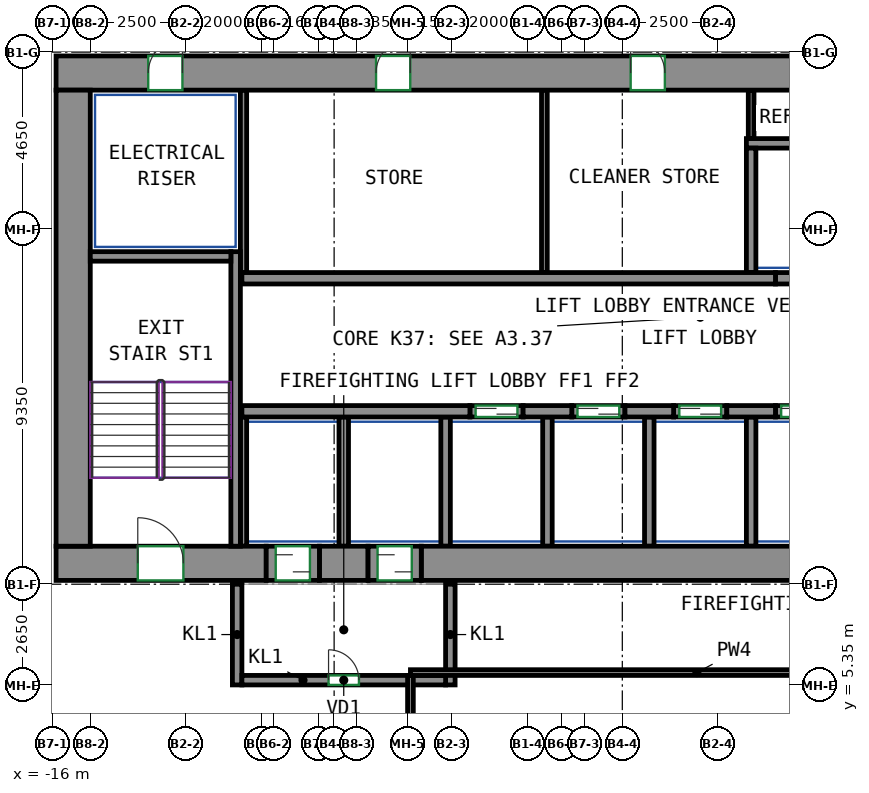
"""IFC4 building model, lengths in metres.
Left out: names, types, materials, properties, quantities, classifications, styles, units other than length and angle.
Written with IfcOpenShell. Run it as: python <this file> out.ifc"""

import sys

from ifc_helpers import new_model, si_unit, direction, frame, frame_2d, origin, place, context, subcontext, project, spatial, rectangle, extrude, source, transform, mapped, element, fill, save


model = new_model("IFC4")
c1 = context("Model", 3, precision=1e-05, world=origin(), true_north=direction((0.0, 1.0)))
c2 = subcontext(c1, "Body", "Model", "MODEL_VIEW")
j1 = project(units=[si_unit("LENGTHUNIT", "METRE"), si_unit("PLANEANGLEUNIT", "RADIAN")], contexts=[c1])
p1 = place(None, origin())
s1 = spatial("IfcSite", under=j1, at=p1, CompositionType="ELEMENT")
p2 = place(p1, origin())
s2 = spatial("IfcBuilding", under=s1, at=p2, CompositionType="ELEMENT")
p3 = place(p2, frame((0.0, 0.0, 157.5)))
s3 = spatial("IfcBuildingStorey", under=s2, at=p3, CompositionType="ELEMENT", Elevation=157.5)
m1 = source(origin(), c2, "Body", "SweptSolid", [
    extrude(rectangle(XDim=5.53, YDim=0.9, at=frame_2d((2.765, 0.0))), origin(), (0.0, 0.0, 1.0), 3.12),
])
p4 = place(p3, frame((-15.9, 8.55, 0.0), z_axis=(0.0, 0.0, 1.0), x_axis=(1.0, 0.0, 0.0)))
e1 = element("IfcWall", 1, at=p4, inside=s3, PredefinedType="SHEAR", context=c2, shape_type="MappedRepresentation", body=[
    mapped(m1, transform((0.0, 0.0, 0.0))),
])
p5 = place(p4, frame((2.15, 0.0, 0.0)))
e2 = element("IfcOpeningElement", 2, at=p5, cuts=e1, PredefinedType="OPENING", context=c2, shape_type="SweptSolid", body=[
    extrude(rectangle(XDim=1.2, YDim=2.1, at=frame_2d((0.6, 1.05))), frame((0.0, 0.46, 0.0), z_axis=(0.0, -1.0, 0.0), x_axis=(1.0, 0.0, 0.0)), (0.0, 0.0, 1.0), 0.92),
])
m2 = source(origin(), c2, "Body", "SweptSolid", [
    extrude(rectangle(XDim=1.28, YDim=0.9, at=frame_2d((0.64, 0.0))), origin(), (0.0, 0.0, 1.0), 3.12),
])
p6 = place(p3, frame((-8.97, 8.55, 0.0), z_axis=(0.0, 0.0, 1.0), x_axis=(1.0, 0.0, 0.0)))
e3 = element("IfcWall", 3, at=p6, inside=s3, PredefinedType="SHEAR", context=c2, shape_type="MappedRepresentation", body=[
    mapped(m2, transform((0.0, 0.0, 0.0))),
])
m3 = source(origin(), c2, "Body", "SweptSolid", [
    extrude(rectangle(XDim=14.18, YDim=0.9, at=frame_2d((7.09, 0.0))), origin(), (0.0, 0.0, 1.0), 3.12),
])
p7 = place(p3, frame((-6.29, 8.55, 0.0), z_axis=(0.0, 0.0, 1.0), x_axis=(1.0, 0.0, 0.0)))
e4 = element("IfcWall", 4, at=p7, inside=s3, PredefinedType="SHEAR", context=c2, shape_type="MappedRepresentation", body=[
    mapped(m3, transform((0.0, 0.0, 0.0))),
])
m4 = source(origin(), c2, "Body", "SweptSolid", [
    extrude(rectangle(XDim=33.9, YDim=0.9, at=frame_2d((16.95, 0.0))), origin(), (0.0, 0.0, 1.0), 3.12),
])
p8 = place(p3, frame((-15.9, 21.45, 0.0), z_axis=(0.0, 0.0, 1.0), x_axis=(1.0, 0.0, 0.0)))
e5 = element("IfcWall", 5, at=p8, inside=s3, PredefinedType="SHEAR", context=c2, shape_type="MappedRepresentation", body=[
    mapped(m4, transform((0.0, 0.0, 0.0))),
])
p9 = place(p8, frame((8.42, 0.0, 0.0)))
e6 = element("IfcOpeningElement", 6, at=p9, cuts=e5, PredefinedType="OPENING", context=c2, shape_type="SweptSolid", body=[
    extrude(rectangle(XDim=0.9, YDim=2.1, at=frame_2d((0.45, 1.05))), frame((0.0, 0.46, 0.0), z_axis=(0.0, -1.0, 0.0), x_axis=(1.0, 0.0, 0.0)), (0.0, 0.0, 1.0), 0.92),
])
p10 = place(p8, frame((15.12, 0.0, 0.0)))
e7 = element("IfcOpeningElement", 7, at=p10, cuts=e5, PredefinedType="OPENING", context=c2, shape_type="SweptSolid", body=[
    extrude(rectangle(XDim=0.9, YDim=2.1, at=frame_2d((0.45, 1.05))), frame((0.0, 0.46, 0.0), z_axis=(0.0, -1.0, 0.0), x_axis=(1.0, 0.0, 0.0)), (0.0, 0.0, 1.0), 0.92),
])
p11 = place(p8, frame((19.944, 0.0, 0.0)))
e8 = element("IfcOpeningElement", 8, at=p11, cuts=e5, PredefinedType="OPENING", context=c2, shape_type="SweptSolid", body=[
    extrude(rectangle(XDim=0.9, YDim=2.1, at=frame_2d((0.45, 1.05))), frame((0.0, 0.46, 0.0), z_axis=(0.0, -1.0, 0.0), x_axis=(1.0, 0.0, 0.0)), (0.0, 0.0, 1.0), 0.92),
])
p12 = place(p8, frame((25.304, 0.0, 0.0)))
e9 = element("IfcOpeningElement", 9, at=p12, cuts=e5, PredefinedType="OPENING", context=c2, shape_type="SweptSolid", body=[
    extrude(rectangle(XDim=0.9, YDim=2.1, at=frame_2d((0.45, 1.05))), frame((0.0, 0.46, 0.0), z_axis=(0.0, -1.0, 0.0), x_axis=(1.0, 0.0, 0.0)), (0.0, 0.0, 1.0), 0.92),
])
p13 = place(p8, frame((2.425, 0.0, 0.0)))
e10 = element("IfcOpeningElement", 10, at=p13, cuts=e5, PredefinedType="OPENING", context=c2, shape_type="SweptSolid", body=[
    extrude(rectangle(XDim=0.9, YDim=2.1, at=frame_2d((0.45, 1.05))), frame((0.0, 0.46, 0.0), z_axis=(0.0, -1.0, 0.0), x_axis=(1.0, 0.0, 0.0)), (0.0, 0.0, 1.0), 0.92),
])
p14 = place(p8, frame((30.575, 0.0, 0.0)))
e11 = element("IfcOpeningElement", 11, at=p14, cuts=e5, PredefinedType="OPENING", context=c2, shape_type="SweptSolid", body=[
    extrude(rectangle(XDim=0.9, YDim=2.1, at=frame_2d((0.45, 1.05))), frame((0.0, 0.46, 0.0), z_axis=(0.0, -1.0, 0.0), x_axis=(1.0, 0.0, 0.0)), (0.0, 0.0, 1.0), 0.92),
])
m5 = source(origin(), c2, "Body", "SweptSolid", [
    extrude(rectangle(XDim=12.0, YDim=0.9, at=frame_2d((6.0, 0.0))), origin(), (0.0, 0.0, 1.0), 3.12),
])
p15 = place(p3, frame((-15.45, 9.0, 0.0), z_axis=(0.0, 0.0, 1.0), x_axis=(0.0, 1.0, 0.0)))
e12 = element("IfcWall", 12, at=p15, inside=s3, PredefinedType="SHEAR", context=c2, shape_type="MappedRepresentation", body=[
    mapped(m5, transform((0.0, 0.0, 0.0))),
])
m6 = source(origin(), c2, "Body", "SweptSolid", [
    extrude(rectangle(XDim=7.75, YDim=0.25, at=frame_2d((3.875, 0.0))), origin(), (0.0, 0.0, 1.0), 3.12),
])
p16 = place(p3, frame((-11.175, 9.0, 0.0), z_axis=(0.0, 0.0, 1.0), x_axis=(0.0, 1.0, 0.0)))
e13 = element("IfcWall", 13, at=p16, inside=s3, PredefinedType="SHEAR", context=c2, shape_type="MappedRepresentation", body=[
    mapped(m6, transform((0.0, 0.0, 0.0))),
])
m7 = source(origin(), c2, "Body", "SweptSolid", [
    extrude(rectangle(XDim=3.7, YDim=0.25, at=frame_2d((1.85, 0.0))), origin(), (0.0, 0.0, 1.0), 3.12),
])
p17 = place(p3, frame((-15.0, 16.625, 0.0), z_axis=(0.0, 0.0, 1.0), x_axis=(1.0, 0.0, 0.0)))
e14 = element("IfcWall", 14, at=p17, inside=s3, PredefinedType="SHEAR", context=c2, shape_type="MappedRepresentation", body=[
    mapped(m7, transform((0.0, 0.0, 0.0))),
])
m8 = source(origin(), c2, "Body", "SweptSolid", [
    extrude(rectangle(XDim=6.0, YDim=0.3, at=frame_2d((3.0, 0.0))), origin(), (0.0, 0.0, 1.0), 3.12),
])
p18 = place(p3, frame((-11.01, 12.55, 0.0), z_axis=(0.0, 0.0, 1.0), x_axis=(1.0, 0.0, 0.0)))
e15 = element("IfcWall", 15, at=p18, inside=s3, PredefinedType="SHEAR", context=c2, shape_type="MappedRepresentation", body=[
    mapped(m8, transform((0.0, 0.0, 0.0))),
])
m9 = source(origin(), c2, "Body", "SweptSolid", [
    extrude(rectangle(XDim=1.28, YDim=0.3, at=frame_2d((0.64, 0.0))), origin(), (0.0, 0.0, 1.0), 3.12),
])
for number, where, z_axis, x_axis in (
    (16, (-3.61, 12.55, 0.0), (0.0, 0.0, 1.0), (1.0, 0.0, 0.0)),
    (17, (-0.93, 12.55, 0.0), (0.0, 0.0, 1.0), (1.0, 0.0, 0.0)),
    (18, (1.75, 12.55, 0.0), (0.0, 0.0, 1.0), (1.0, 0.0, 0.0)),
):
    element("IfcWall", number, at=place(p3, frame(where, z_axis=z_axis, x_axis=x_axis)), inside=s3, PredefinedType="SHEAR", context=c2, shape_type="MappedRepresentation", body=[
        mapped(m9, transform((0.0, 0.0, 0.0))),
    ])
m10 = source(origin(), c2, "Body", "SweptSolid", [
    extrude(rectangle(XDim=14.04, YDim=0.3, at=frame_2d((7.02, 0.0))), origin(), (0.0, 0.0, 1.0), 3.12),
])
p19 = place(p3, frame((-11.01, 16.05, 0.0), z_axis=(0.0, 0.0, 1.0), x_axis=(1.0, 0.0, 0.0)))
e19 = element("IfcWall", 19, at=p19, inside=s3, PredefinedType="SHEAR", context=c2, shape_type="MappedRepresentation", body=[
    mapped(m10, transform((0.0, 0.0, 0.0))),
])
m11 = source(origin(), c2, "Body", "SweptSolid", [
    extrude(rectangle(XDim=1.4, YDim=0.3, at=frame_2d((0.7, 0.0))), origin(), (0.0, 0.0, 1.0), 3.12),
])
p20 = place(p3, frame((-5.01, 12.55, 0.0), z_axis=(0.0, 0.0, 1.0), x_axis=(1.0, 0.0, 0.0)))
e20 = element("IfcWall", 20, at=p20, inside=s3, PredefinedType="PARTITIONING", context=c2, shape_type="MappedRepresentation", body=[
    mapped(m11, transform((0.0, 0.0, 0.0))),
])
p21 = place(p20, frame((0.15, 0.0, 0.0)))
e21 = element("IfcOpeningElement", 21, at=p21, cuts=e20, PredefinedType="OPENING", context=c2, shape_type="SweptSolid", body=[
    extrude(rectangle(XDim=1.1, YDim=2.1, at=frame_2d((0.55, 1.05))), frame((0.0, 0.16, 0.0), z_axis=(0.0, -1.0, 0.0), x_axis=(1.0, 0.0, 0.0)), (0.0, 0.0, 1.0), 0.32),
])
m12 = source(origin(), c2, "Body", "SweptSolid", [
    extrude(rectangle(XDim=1.4, YDim=0.3, at=frame_2d((0.7, 0.0))), origin(), (0.0, 0.0, 1.0), 3.12),
])
p22 = place(p3, frame((-2.33, 12.55, 0.0), z_axis=(0.0, 0.0, 1.0), x_axis=(1.0, 0.0, 0.0)))
e22 = element("IfcWall", 22, at=p22, inside=s3, PredefinedType="PARTITIONING", context=c2, shape_type="MappedRepresentation", body=[
    mapped(m12, transform((0.0, 0.0, 0.0))),
])
p23 = place(p22, frame((0.15, 0.0, 0.0)))
e23 = element("IfcOpeningElement", 23, at=p23, cuts=e22, PredefinedType="OPENING", context=c2, shape_type="SweptSolid", body=[
    extrude(rectangle(XDim=1.1, YDim=2.1, at=frame_2d((0.55, 1.05))), frame((0.0, 0.16, 0.0), z_axis=(0.0, -1.0, 0.0), x_axis=(1.0, 0.0, 0.0)), (0.0, 0.0, 1.0), 0.32),
])
p24 = place(p3, frame((0.35, 12.55, 0.0), z_axis=(0.0, 0.0, 1.0), x_axis=(1.0, 0.0, 0.0)))
e24 = element("IfcWall", 24, at=p24, inside=s3, PredefinedType="PARTITIONING", context=c2, shape_type="MappedRepresentation", body=[
    mapped(m11, transform((0.0, 0.0, 0.0))),
])
p25 = place(p24, frame((0.15, 0.0, 0.0)))
e25 = element("IfcOpeningElement", 25, at=p25, cuts=e24, PredefinedType="OPENING", context=c2, shape_type="SweptSolid", body=[
    extrude(rectangle(XDim=1.1, YDim=2.1, at=frame_2d((0.55, 1.05))), frame((0.0, 0.16, 0.0), z_axis=(0.0, -1.0, 0.0), x_axis=(1.0, 0.0, 0.0)), (0.0, 0.0, 1.0), 0.32),
])
p26 = place(p3, frame((3.03, 12.55, 0.0), z_axis=(0.0, 0.0, 1.0), x_axis=(1.0, 0.0, 0.0)))
e26 = element("IfcWall", 26, at=p26, inside=s3, PredefinedType="PARTITIONING", context=c2, shape_type="MappedRepresentation", body=[
    mapped(m11, transform((0.0, 0.0, 0.0))),
])
p27 = place(p26, frame((0.15, 0.0, 0.0)))
e27 = element("IfcOpeningElement", 27, at=p27, cuts=e26, PredefinedType="OPENING", context=c2, shape_type="SweptSolid", body=[
    extrude(rectangle(XDim=1.1, YDim=2.1, at=frame_2d((0.55, 1.05))), frame((0.0, 0.16, 0.0), z_axis=(0.0, -1.0, 0.0), x_axis=(1.0, 0.0, 0.0)), (0.0, 0.0, 1.0), 0.32),
])
p28 = place(p3, frame((3.03, 16.05, 0.0), z_axis=(0.0, 0.0, 1.0), x_axis=(1.0, 0.0, 0.0)))
e28 = element("IfcWall", 28, at=p28, inside=s3, PredefinedType="PARTITIONING", context=c2, shape_type="MappedRepresentation", body=[
    mapped(m11, transform((0.0, 0.0, 0.0))),
])
m13 = source(origin(), c2, "Body", "SweptSolid", [
    extrude(rectangle(XDim=2.65, YDim=0.25, at=frame_2d((1.325, 0.0))), origin(), (0.0, 0.0, 1.0), 3.12),
])
for number, where, z_axis, x_axis in (
    (29, (-11.135, 5.35, 0.0), (0.0, 0.0, 1.0), (0.0, 1.0, 0.0)),
    (30, (-5.525, 5.35, 0.0), (0.0, 0.0, 1.0), (0.0, 1.0, 0.0)),
):
    element("IfcWall", number, at=place(p3, frame(where, z_axis=z_axis, x_axis=x_axis)), inside=s3, PredefinedType="PARTITIONING", context=c2, shape_type="MappedRepresentation", body=[
        mapped(m13, transform((0.0, 0.0, 0.0))),
    ])
m14 = source(origin(), c2, "Body", "SweptSolid", [
    extrude(rectangle(XDim=5.36, YDim=0.25, at=frame_2d((2.68, 0.0))), origin(), (0.0, 0.0, 1.0), 3.12),
])
p29 = place(p3, frame((-11.01, 5.475, 0.0), z_axis=(0.0, 0.0, 1.0), x_axis=(1.0, 0.0, 0.0)))
e31 = element("IfcWall", 31, at=p29, inside=s3, PredefinedType="PARTITIONING", context=c2, shape_type="MappedRepresentation", body=[
    mapped(m14, transform((0.0, 0.0, 0.0))),
])
p30 = place(p29, frame((2.28, 0.0, 0.0)))
e32 = element("IfcOpeningElement", 32, at=p30, cuts=e31, PredefinedType="OPENING", context=c2, shape_type="SweptSolid", body=[
    extrude(rectangle(XDim=0.8, YDim=2.0, at=frame_2d((0.4, 1.0))), frame((0.0, 0.135, 0.0), z_axis=(0.0, -1.0, 0.0), x_axis=(1.0, 0.0, 0.0)), (0.0, 0.0, 1.0), 0.27),
])
m15 = source(origin(), c2, "Body", "SweptSolid", [
    extrude(rectangle(XDim=10.97, YDim=0.25, at=frame_2d((5.485, 0.0))), origin(), (0.0, 0.0, 1.0), 3.12),
])
p31 = place(p3, frame((2.265, 19.6, 0.0), z_axis=(0.0, 0.0, 1.0), x_axis=(1.0, 0.0, 0.0)))
e33 = element("IfcWall", 33, at=p31, inside=s3, PredefinedType="PARTITIONING", context=c2, shape_type="MappedRepresentation", body=[
    mapped(m15, transform((0.0, 0.0, 0.0))),
])
m16 = source(origin(), c2, "Body", "SweptSolid", [
    extrude(rectangle(XDim=4.8, YDim=0.165, at=frame_2d((2.4, 0.0))), origin(), (0.0, 0.0, 1.0), 3.12),
])
p32 = place(p3, frame((-10.968, 16.2, 0.0), z_axis=(0.0, 0.0, 1.0), x_axis=(0.0, 1.0, 0.0)))
e34 = element("IfcWall", 34, at=p32, inside=s3, PredefinedType="PARTITIONING", context=c2, shape_type="MappedRepresentation", body=[
    mapped(m16, transform((0.0, 0.0, 0.0))),
])
m17 = source(origin(), c2, "Body", "SweptSolid", [
    extrude(rectangle(XDim=3.275, YDim=0.25, at=frame_2d((1.638, 0.0))), origin(), (0.0, 0.0, 1.0), 3.12),
])
p33 = place(p3, frame((2.39, 16.2, 0.0), z_axis=(0.0, 0.0, 1.0), x_axis=(0.0, 1.0, 0.0)))
e35 = element("IfcWall", 35, at=p33, inside=s3, PredefinedType="PARTITIONING", context=c2, shape_type="MappedRepresentation", body=[
    mapped(m17, transform((0.0, 0.0, 0.0))),
])
m18 = source(origin(), c2, "Body", "SweptSolid", [
    extrude(rectangle(XDim=3.4, YDim=0.25, at=frame_2d((1.7, 0.0))), origin(), (0.0, 0.0, 1.0), 3.12),
])
for number, where, z_axis, x_axis in (
    (36, (2.39, 9.0, 0.0), (0.0, 0.0, 1.0), (0.0, 1.0, 0.0)),
    (37, (-0.29, 9.0, 0.0), (0.0, 0.0, 1.0), (0.0, 1.0, 0.0)),
):
    element("IfcWall", number, at=place(p3, frame(where, z_axis=z_axis, x_axis=x_axis)), inside=s3, PredefinedType="PARTITIONING", context=c2, shape_type="MappedRepresentation", body=[
        mapped(m18, transform((0.0, 0.0, 0.0))),
    ])
m19 = source(origin(), c2, "Body", "SweptSolid", [
    extrude(rectangle(XDim=3.4, YDim=0.165, at=frame_2d((1.7, 0.0))), origin(), (0.0, 0.0, 1.0), 3.12),
])
p34 = place(p3, frame((-10.968, 9.0, 0.0), z_axis=(0.0, 0.0, 1.0), x_axis=(0.0, 1.0, 0.0)))
e38 = element("IfcWall", 38, at=p34, inside=s3, PredefinedType="PARTITIONING", context=c2, shape_type="MappedRepresentation", body=[
    mapped(m19, transform((0.0, 0.0, 0.0))),
])
for number, where, z_axis, x_axis in (
    (39, (-2.97, 9.0, 0.0), (0.0, 0.0, 1.0), (0.0, 1.0, 0.0)),
    (40, (-5.65, 9.0, 0.0), (0.0, 0.0, 1.0), (0.0, 1.0, 0.0)),
    (41, (-8.33, 9.0, 0.0), (0.0, 0.0, 1.0), (0.0, 1.0, 0.0)),
):
    element("IfcWall", number, at=place(p3, frame(where, z_axis=z_axis, x_axis=x_axis)), inside=s3, PredefinedType="PARTITIONING", context=c2, shape_type="MappedRepresentation", body=[
        mapped(m18, transform((0.0, 0.0, 0.0))),
    ])
m20 = source(origin(), c2, "Body", "SweptSolid", [
    extrude(rectangle(XDim=4.8, YDim=0.15, at=frame_2d((2.4, 0.0))), origin(), (0.0, 0.0, 1.0), 3.12),
])
p35 = place(p3, frame((-3.05, 16.2, 0.0), z_axis=(0.0, 0.0, 1.0), x_axis=(0.0, 1.0, 0.0)))
e42 = element("IfcWall", 42, at=p35, inside=s3, PredefinedType="PARTITIONING", context=c2, shape_type="MappedRepresentation", body=[
    mapped(m20, transform((0.0, 0.0, 0.0))),
])
m21 = source(origin(), c2, "Body", "SweptSolid", [
    extrude(rectangle(XDim=1.275, YDim=0.15, at=frame_2d((0.637, 0.0))), origin(), (0.0, 0.0, 1.0), 3.12),
])
p36 = place(p3, frame((2.39, 19.725, 0.0), z_axis=(0.0, 0.0, 1.0), x_axis=(0.0, 1.0, 0.0)))
e43 = element("IfcWall", 43, at=p36, inside=s3, PredefinedType="PARTITIONING", context=c2, shape_type="MappedRepresentation", body=[
    mapped(m21, transform((0.0, 0.0, 0.0))),
])
m22 = source(origin(), c2, "Body", "SweptSolid", [
    extrude(rectangle(XDim=1.4, YDim=0.9, at=frame_2d((0.7, 0.0))), origin(), (0.0, 0.0, 1.0), 2.7),
])
p37 = place(p3, frame((-10.37, 8.55, 0.0), z_axis=(0.0, 0.0, 1.0), x_axis=(1.0, 0.0, 0.0)))
e44 = element("IfcWall", 44, at=p37, inside=s3, PredefinedType="PARTITIONING", context=c2, shape_type="MappedRepresentation", body=[
    mapped(m22, transform((0.0, 0.0, 0.0))),
])
p38 = place(p37, frame((0.25, 0.0, 0.0)))
e45 = element("IfcOpeningElement", 45, at=p38, cuts=e44, PredefinedType="OPENING", context=c2, shape_type="SweptSolid", body=[
    extrude(rectangle(XDim=0.9, YDim=2.1, at=frame_2d((0.45, 1.05))), frame((0.0, 0.46, 0.0), z_axis=(0.0, -1.0, 0.0), x_axis=(1.0, 0.0, 0.0)), (0.0, 0.0, 1.0), 0.92),
])
m23 = source(origin(), c2, "Body", "SweptSolid", [
    extrude(rectangle(XDim=1.4, YDim=0.9, at=frame_2d((0.7, 0.0))), origin(), (0.0, 0.0, 1.0), 2.7),
])
p39 = place(p3, frame((-7.69, 8.55, 0.0), z_axis=(0.0, 0.0, 1.0), x_axis=(1.0, 0.0, 0.0)))
e46 = element("IfcWall", 46, at=p39, inside=s3, PredefinedType="PARTITIONING", context=c2, shape_type="MappedRepresentation", body=[
    mapped(m23, transform((0.0, 0.0, 0.0))),
])
p40 = place(p39, frame((0.25, 0.0, 0.0)))
e47 = element("IfcOpeningElement", 47, at=p40, cuts=e46, PredefinedType="OPENING", context=c2, shape_type="SweptSolid", body=[
    extrude(rectangle(XDim=0.9, YDim=2.1, at=frame_2d((0.45, 1.05))), frame((0.0, 0.46, 0.0), z_axis=(0.0, -1.0, 0.0), x_axis=(1.0, 0.0, 0.0)), (0.0, 0.0, 1.0), 0.92),
])
p41 = place(p3, frame((-6.575, -9.4, 0.0), z_axis=(0.0, 0.0, 1.0), x_axis=(0.0, 1.0, 0.0)))
e48 = element("IfcWall", 48, at=p41, inside=s3, PredefinedType="PARTITIONING", context=c2, shape_type="SweptSolid", body=[
    extrude(rectangle(XDim=15.0, YDim=0.15, at=frame_2d((7.5, 0.0))), origin(), (0.0, 0.0, 1.0), 3.12),
])
p42 = place(p3, frame((-6.575, 5.675, 0.0), z_axis=(0.0, 0.0, 1.0), x_axis=(1.0, 0.0, 0.0)))
e49 = element("IfcWall", 49, at=p42, inside=s3, PredefinedType="PARTITIONING", context=c2, shape_type="SweptSolid", body=[
    extrude(rectangle(XDim=15.075, YDim=0.15, at=frame_2d((7.538, 0.0))), origin(), (0.0, 0.0, 1.0), 3.12),
])
p43 = place(p30, origin())
e50 = element("IfcDoor", 50, at=p43, inside=s3, OperationType="SINGLE_SWING_LEFT", PredefinedType="DOOR", context=c2, shape_type="SweptSolid", body=[
    extrude(rectangle(XDim=0.8, YDim=2.0, at=frame_2d((0.4, 1.0))), frame((0.0, 0.025, 0.0), z_axis=(0.0, -1.0, 0.0), x_axis=(1.0, 0.0, 0.0)), (0.0, 0.0, 1.0), 0.05),
])
fill(e32, e50)
p44 = place(p38, origin())
e51 = element("IfcDoor", 51, at=p44, inside=s3, OperationType="SLIDING_TO_LEFT", PredefinedType="DOOR", context=c2, shape_type="SweptSolid", body=[
    extrude(rectangle(XDim=0.9, YDim=2.1, at=frame_2d((0.45, 1.05))), frame((0.0, 0.355, 0.0), z_axis=(0.0, -1.0, 0.0), x_axis=(1.0, 0.0, 0.0)), (0.0, 0.0, 1.0), 0.05),
])
fill(e45, e51)
p45 = place(p40, origin())
e52 = element("IfcDoor", 52, at=p45, inside=s3, OperationType="SLIDING_TO_RIGHT", PredefinedType="DOOR", context=c2, shape_type="SweptSolid", body=[
    extrude(rectangle(XDim=0.9, YDim=2.1, at=frame_2d((0.45, 1.05))), frame((0.0, 0.355, 0.0), z_axis=(0.0, -1.0, 0.0), x_axis=(1.0, 0.0, 0.0)), (0.0, 0.0, 1.0), 0.05),
])
fill(e47, e52)
p46 = place(p21, origin())
e53 = element("IfcDoor", 53, at=p46, inside=s3, OperationType="DOUBLE_DOOR_SLIDING", PredefinedType="DOOR", context=c2, shape_type="SweptSolid", body=[
    extrude(rectangle(XDim=1.1, YDim=2.1, at=frame_2d((0.55, 1.05))), frame((0.0, 0.025, 0.0), z_axis=(0.0, -1.0, 0.0), x_axis=(1.0, 0.0, 0.0)), (0.0, 0.0, 1.0), 0.05),
])
fill(e21, e53)
p47 = place(p23, origin())
e54 = element("IfcDoor", 54, at=p47, inside=s3, OperationType="DOUBLE_DOOR_SLIDING", PredefinedType="DOOR", context=c2, shape_type="SweptSolid", body=[
    extrude(rectangle(XDim=1.1, YDim=2.1, at=frame_2d((0.55, 1.05))), frame((0.0, 0.025, 0.0), z_axis=(0.0, -1.0, 0.0), x_axis=(1.0, 0.0, 0.0)), (0.0, 0.0, 1.0), 0.05),
])
fill(e23, e54)
p48 = place(p25, origin())
e55 = element("IfcDoor", 55, at=p48, inside=s3, OperationType="DOUBLE_DOOR_SLIDING", PredefinedType="DOOR", context=c2, shape_type="SweptSolid", body=[
    extrude(rectangle(XDim=1.1, YDim=2.1, at=frame_2d((0.55, 1.05))), frame((0.0, 0.025, 0.0), z_axis=(0.0, -1.0, 0.0), x_axis=(1.0, 0.0, 0.0)), (0.0, 0.0, 1.0), 0.05),
])
fill(e25, e55)
p49 = place(p27, origin())
e56 = element("IfcDoor", 56, at=p49, inside=s3, OperationType="DOUBLE_DOOR_SLIDING", PredefinedType="DOOR", context=c2, shape_type="SweptSolid", body=[
    extrude(rectangle(XDim=1.1, YDim=2.1, at=frame_2d((0.55, 1.05))), frame((0.0, 0.025, 0.0), z_axis=(0.0, -1.0, 0.0), x_axis=(1.0, 0.0, 0.0)), (0.0, 0.0, 1.0), 0.05),
])
fill(e27, e56)
p50 = place(p9, origin())
e57 = element("IfcDoor", 57, at=p50, inside=s3, OperationType="SINGLE_SWING_RIGHT", PredefinedType="DOOR", context=c2, shape_type="SweptSolid", body=[
    extrude(rectangle(XDim=0.9, YDim=2.1, at=frame_2d((0.45, 1.05))), frame((0.0, -0.305, 0.0), z_axis=(0.0, -1.0, 0.0), x_axis=(1.0, 0.0, 0.0)), (0.0, 0.0, 1.0), 0.05),
])
fill(e6, e57)
p51 = place(p10, origin())
e58 = element("IfcDoor", 58, at=p51, inside=s3, OperationType="SINGLE_SWING_LEFT", PredefinedType="DOOR", context=c2, shape_type="SweptSolid", body=[
    extrude(rectangle(XDim=0.9, YDim=2.1, at=frame_2d((0.45, 1.05))), frame((0.0, -0.305, 0.0), z_axis=(0.0, -1.0, 0.0), x_axis=(1.0, 0.0, 0.0)), (0.0, 0.0, 1.0), 0.05),
])
fill(e7, e58)
p52 = place(p13, origin())
e59 = element("IfcDoor", 59, at=p52, inside=s3, OperationType="SINGLE_SWING_RIGHT", PredefinedType="DOOR", context=c2, shape_type="SweptSolid", body=[
    extrude(rectangle(XDim=0.9, YDim=2.1, at=frame_2d((0.45, 1.05))), frame((0.0, -0.305, 0.0), z_axis=(0.0, -1.0, 0.0), x_axis=(1.0, 0.0, 0.0)), (0.0, 0.0, 1.0), 0.05),
])
fill(e10, e59)
p53 = place(p5, origin())
e60 = element("IfcDoor", 60, at=p53, inside=s3, OperationType="DOUBLE_DOOR_SINGLE_SWING", PredefinedType="DOOR", context=c2, shape_type="SweptSolid", body=[
    extrude(rectangle(XDim=1.2, YDim=2.1, at=frame_2d((0.6, 1.05))), frame((0.0, 0.355, 0.0), z_axis=(0.0, -1.0, 0.0), x_axis=(1.0, 0.0, 0.0)), (0.0, 0.0, 1.0), 0.05),
])
fill(e2, e60)
save(model, sys.argv[1])
